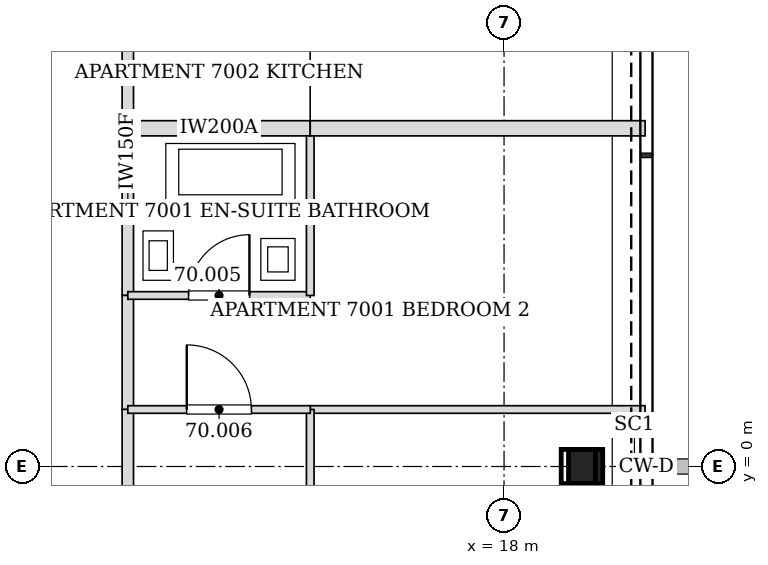
"""IFC4 building model, lengths in metres.
Left out: names, types, materials, properties, quantities, classifications, styles, units other than length and angle.
Written with IfcOpenShell. Run it as: python <this file> out.ifc"""

import sys

from ifc_helpers import new_model, si_unit, direction, frame, frame_2d, origin, origin_2d, place, context, subcontext, project, spatial, rectangle, hollow_rectangle, extrude, element, fill, save


model = new_model("IFC4")
c1 = context("Model", 3, precision=1e-05, world=origin(), true_north=direction((0.0, 1.0)))
c2 = subcontext(c1, "Body", "Model", "MODEL_VIEW")
j1 = project(units=[si_unit("LENGTHUNIT", "METRE"), si_unit("PLANEANGLEUNIT", "RADIAN")], contexts=[c1])
p1 = place(None, origin())
s1 = spatial("IfcSite", under=j1, at=p1, CompositionType="ELEMENT")
p2 = place(p1, origin())
s2 = spatial("IfcBuilding", under=s1, at=p2, CompositionType="ELEMENT")
p3 = place(p2, frame((0.0, 0.0, 287.8)))
s3 = spatial("IfcBuildingStorey", under=s2, at=p3, CompositionType="ELEMENT", Elevation=287.8)
p4 = place(p3, frame((19.073, 0.0, 0.0), z_axis=(-0.028281086024, 0.0, 0.999600010091), x_axis=(0.0, -1.0, 0.0)))
e1 = element("IfcColumn", 1, at=p4, inside=s3, PredefinedType="COLUMN", context=c2, shape_type="SweptSolid", body=[
    extrude(hollow_rectangle(XDim=0.45, YDim=0.45, WallThickness=0.02, at=origin_2d()), origin(), (0.0, 0.0, 1.0), 3.401),
])
p5 = place(p3, frame((13.05, 2.249, 0.0), z_axis=(0.0, 0.0, 1.0), x_axis=(0.0, 1.0, 0.0)))
e2 = element("IfcWall", 2, at=p5, inside=s3, PredefinedType="PARTITIONING", context=c2, shape_type="SweptSolid", body=[
    extrude(rectangle(XDim=2.202, YDim=0.15, at=frame_2d((1.101, 0.0))), origin(), (0.0, 0.0, 1.0), 3.2),
])
p6 = place(p3, frame((13.05, 0.749, 0.0), z_axis=(0.0, 0.0, 1.0), x_axis=(0.0, 1.0, 0.0)))
e3 = element("IfcWall", 3, at=p6, inside=s3, PredefinedType="PARTITIONING", context=c2, shape_type="SweptSolid", body=[
    extrude(rectangle(XDim=1.502, YDim=0.15, at=frame_2d((0.751, 0.0))), origin(), (0.0, 0.0, 1.0), 3.2),
])
p7 = place(p3, frame((13.05, -2.5, 0.0), z_axis=(0.0, 0.0, 1.0), x_axis=(0.0, 1.0, 0.0)))
e4 = element("IfcWall", 4, at=p7, inside=s3, PredefinedType="PARTITIONING", context=c2, shape_type="SweptSolid", body=[
    extrude(rectangle(XDim=3.251, YDim=0.15, at=frame_2d((1.625, 0.0))), origin(), (0.0, 0.0, 1.0), 2.349),
])
p8 = place(p7, frame((1.15, 0.0, 0.0)))
e5 = element("IfcOpeningElement", 5, at=p8, cuts=e4, PredefinedType="OPENING", context=c2, shape_type="SweptSolid", body=[
    extrude(rectangle(XDim=0.95, YDim=2.1, at=frame_2d((0.475, 1.05))), frame((0.0, 0.085, 0.0), z_axis=(0.0, -1.0, 0.0), x_axis=(1.0, 0.0, 0.0)), (0.0, 0.0, 1.0), 0.17),
])
p9 = place(p3, frame((13.05, 4.449, 0.0), z_axis=(0.0, 0.0, 1.0), x_axis=(0.0, 1.0, 0.0)))
e6 = element("IfcWall", 6, at=p9, inside=s3, PredefinedType="PARTITIONING", context=c2, shape_type="SweptSolid", body=[
    extrude(rectangle(XDim=1.452, YDim=0.15, at=frame_2d((0.726, 0.0))), origin(), (0.0, 0.0, 1.0), 3.2),
])
p10 = place(p3, frame((19.855, 0.75, 0.0), z_axis=(0.0, 0.0, 1.0), x_axis=(-1.0, 0.0, 0.0)))
e7 = element("IfcWall", 7, at=p10, inside=s3, PredefinedType="PARTITIONING", context=c2, shape_type="SweptSolid", body=[
    extrude(rectangle(XDim=4.405, YDim=0.1, at=frame_2d((2.203, 0.0))), origin(), (0.0, 0.0, 1.0), 2.73),
])
p11 = place(p3, frame((15.45, 0.75, 0.0), z_axis=(0.0, 0.0, 1.0), x_axis=(0.0, -1.0, 0.0)))
e8 = element("IfcWall", 8, at=p11, inside=s3, PredefinedType="PARTITIONING", context=c2, shape_type="SweptSolid", body=[
    extrude(rectangle(XDim=3.4, YDim=0.1, at=frame_2d((1.7, 0.0))), origin(), (0.0, 0.0, 1.0), 2.349),
])
p12 = place(p3, frame((13.05, 2.25, 0.0), z_axis=(0.0, 0.0, 1.0), x_axis=(1.0, 0.0, 0.0)))
e9 = element("IfcWall", 9, at=p12, inside=s3, PredefinedType="PARTITIONING", context=c2, shape_type="SweptSolid", body=[
    extrude(rectangle(XDim=2.4, YDim=0.1, at=frame_2d((1.2, 0.0))), origin(), (0.0, 0.0, 1.0), 2.591),
])
p13 = place(p12, frame((0.8, 0.0, 0.0)))
e10 = element("IfcOpeningElement", 10, at=p13, cuts=e9, PredefinedType="OPENING", context=c2, shape_type="SweptSolid", body=[
    extrude(rectangle(XDim=0.8, YDim=2.1, at=frame_2d((0.4, 1.05))), frame((0.0, 0.06, 0.0), z_axis=(0.0, -1.0, 0.0), x_axis=(1.0, 0.0, 0.0)), (0.0, 0.0, 1.0), 0.12),
])
p14 = place(p3, frame((15.45, 2.25, 0.0), z_axis=(0.0, 0.0, 1.0), x_axis=(0.0, 1.0, 0.0)))
e11 = element("IfcWall", 11, at=p14, inside=s3, PredefinedType="PARTITIONING", context=c2, shape_type="SweptSolid", body=[
    extrude(rectangle(XDim=2.2, YDim=0.1, at=frame_2d((1.1, 0.0))), origin(), (0.0, 0.0, 1.0), 3.2),
])
p15 = place(p3, frame((15.45, 4.45, 0.0), z_axis=(0.0, 0.0, 1.0), x_axis=(-1.0, 0.0, 0.0)))
e12 = element("IfcWall", 12, at=p15, inside=s3, PredefinedType="PARTITIONING", context=c2, shape_type="SweptSolid", body=[
    extrude(rectangle(XDim=2.4, YDim=0.2, at=frame_2d((1.2, 0.0))), origin(), (0.0, 0.0, 1.0), 2.591),
])
p16 = place(p3, frame((13.05, 0.75, 0.0), z_axis=(0.0, 0.0, 1.0), x_axis=(1.0, 0.0, 0.0)))
e13 = element("IfcWall", 13, at=p16, inside=s3, PredefinedType="PARTITIONING", context=c2, shape_type="SweptSolid", body=[
    extrude(rectangle(XDim=2.401, YDim=0.1, at=frame_2d((1.2, 0.0))), origin(), (0.0, 0.0, 1.0), 2.591),
])
p17 = place(p16, frame((0.775, 0.0, 0.0)))
e14 = element("IfcOpeningElement", 14, at=p17, cuts=e13, PredefinedType="OPENING", context=c2, shape_type="SweptSolid", body=[
    extrude(rectangle(XDim=0.85, YDim=2.1, at=frame_2d((0.425, 1.05))), frame((0.0, 0.06, 0.0), z_axis=(0.0, -1.0, 0.0), x_axis=(1.0, 0.0, 0.0)), (0.0, 0.0, 1.0), 0.12),
])
p18 = place(p3, frame((19.855, 4.45, 0.0), z_axis=(0.0, 0.0, 1.0), x_axis=(-1.0, 0.0, 0.0)))
e15 = element("IfcWall", 15, at=p18, inside=s3, PredefinedType="PARTITIONING", context=c2, shape_type="SweptSolid", body=[
    extrude(rectangle(XDim=4.405, YDim=0.2, at=frame_2d((2.203, 0.0))), origin(), (0.0, 0.0, 1.0), 2.73),
])
p19 = place(p13, origin())
e16 = element("IfcDoor", 16, at=p19, inside=s3, OperationType="SINGLE_SWING_RIGHT", PredefinedType="DOOR", context=c2, shape_type="SweptSolid", body=[
    extrude(rectangle(XDim=0.8, YDim=2.1, at=frame_2d((0.4, 1.05))), frame((0.0, 0.025, 0.0), z_axis=(0.0, -1.0, 0.0), x_axis=(1.0, 0.0, 0.0)), (0.0, 0.0, 1.0), 0.05),
])
fill(e10, e16)
p20 = place(p17, origin())
e17 = element("IfcDoor", 17, at=p20, inside=s3, OperationType="SINGLE_SWING_LEFT", PredefinedType="DOOR", context=c2, shape_type="SweptSolid", body=[
    extrude(rectangle(XDim=0.85, YDim=2.1, at=frame_2d((0.425, 1.05))), frame((0.0, 0.025, 0.0), z_axis=(0.0, -1.0, 0.0), x_axis=(1.0, 0.0, 0.0)), (0.0, 0.0, 1.0), 0.05),
])
fill(e14, e17)
save(model, sys.argv[1])
